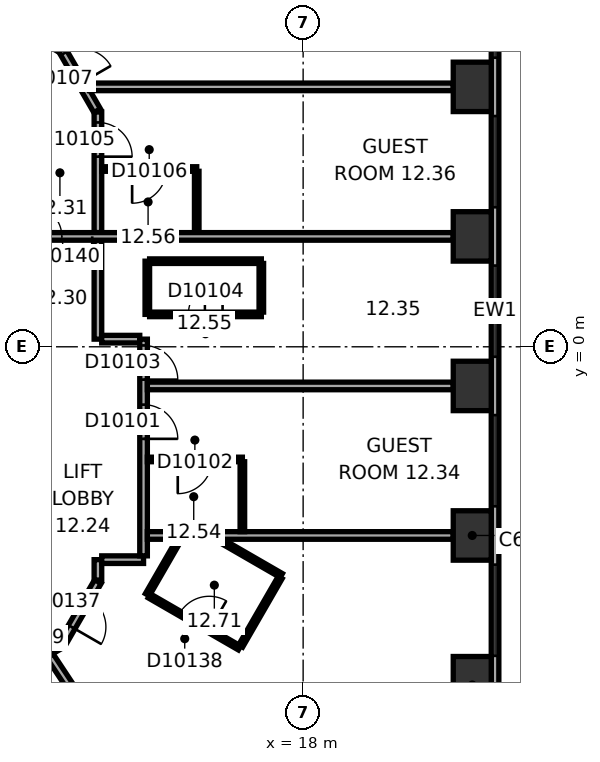
"""IFC4 building model, lengths in metres.
Left out: names, types, materials, properties, quantities, classifications, styles, units other than length and angle.
Written with IfcOpenShell. Run it as: python <this file> out.ifc"""

import sys

from ifc_helpers import new_model, si_unit, direction, frame, frame_2d, origin, origin_2d, place, context, subcontext, project, spatial, rectangle, extrude, element, fill, save


model = new_model("IFC4")
c1 = context("Model", 3, precision=1e-05, world=origin(), true_north=direction((0.0, 1.0)))
c2 = subcontext(c1, "Body", "Model", "MODEL_VIEW")
j1 = project(units=[si_unit("LENGTHUNIT", "METRE"), si_unit("PLANEANGLEUNIT", "RADIAN")], contexts=[c1])
p1 = place(None, origin())
s1 = spatial("IfcSite", under=j1, at=p1, CompositionType="ELEMENT")
p2 = place(p1, origin())
s2 = spatial("IfcBuilding", under=s1, at=p2, CompositionType="ELEMENT")
p3 = place(p2, frame((0.0, 0.0, 60.5)))
s3 = spatial("IfcBuildingStorey", under=s2, at=p3, CompositionType="ELEMENT", Elevation=60.5)
p4 = place(p3, frame((22.45, -8.899, 0.0), z_axis=(0.0, 0.0, 1.0), x_axis=(0.0, 1.0, 0.0)))
e1 = element("IfcColumn", 1, at=p4, inside=s3, PredefinedType="COLUMN", context=c2, shape_type="SweptSolid", body=[
    extrude(rectangle(XDim=1.5, YDim=1.0, at=origin_2d()), origin(), (0.0, 0.0, 1.0), 3.3),
])
for number, where, z_axis, x_axis in (
    (2, (22.45, -4.965, 0.0), (0.0, 0.0, 1.0), (0.0, 1.0, 0.0)),
    (3, (22.45, -1.03, 0.0), (0.0, 0.0, 1.0), (0.0, 1.0, 0.0)),
    (4, (22.45, 2.905, 0.0), (0.0, 0.0, 1.0), (0.0, 1.0, 0.0)),
    (5, (22.45, 6.839, 0.0), (0.0, 0.0, 1.0), (0.0, 1.0, 0.0)),
):
    element("IfcColumn", number, at=place(p3, frame(where, z_axis=z_axis, x_axis=x_axis)), inside=s3, PredefinedType="COLUMN", context=c2, shape_type="SweptSolid", body=[
        extrude(rectangle(XDim=1.3, YDim=1.0, at=origin_2d()), origin(), (0.0, 0.0, 1.0), 3.3),
    ])
p5 = place(p3, frame((23.05, -9.687, 0.0), z_axis=(0.0, 0.0, 1.0), x_axis=(0.0, 1.0, 0.0)))
e6 = element("IfcWall", 6, at=p5, inside=s3, PredefinedType="STANDARD", context=c2, shape_type="SweptSolid", body=[
    extrude(rectangle(XDim=21.246, YDim=0.2, at=frame_2d((10.623, 0.0))), origin(), (0.0, 0.0, 1.0), 3.3),
])
p6 = place(p5, frame((1.555, 0.0, 0.8)))
e7 = element("IfcOpeningElement", 7, at=p6, cuts=e6, PredefinedType="OPENING", context=c2, shape_type="SweptSolid", body=[
    extrude(rectangle(XDim=2.4, YDim=1.7, at=frame_2d((1.2, 0.85))), frame((0.0, 0.11, 0.0), z_axis=(0.0, -1.0, 0.0), x_axis=(1.0, 0.0, 0.0)), (0.0, 0.0, 1.0), 0.22),
])
p7 = place(p5, frame((5.489, 0.0, 0.8)))
e8 = element("IfcOpeningElement", 8, at=p7, cuts=e6, PredefinedType="OPENING", context=c2, shape_type="SweptSolid", body=[
    extrude(rectangle(XDim=2.4, YDim=1.7, at=frame_2d((1.2, 0.85))), frame((0.0, 0.11, 0.0), z_axis=(0.0, -1.0, 0.0), x_axis=(1.0, 0.0, 0.0)), (0.0, 0.0, 1.0), 0.22),
])
p8 = place(p5, frame((9.424, 0.0, 0.8)))
e9 = element("IfcOpeningElement", 9, at=p8, cuts=e6, PredefinedType="OPENING", context=c2, shape_type="SweptSolid", body=[
    extrude(rectangle(XDim=2.4, YDim=1.7, at=frame_2d((1.2, 0.85))), frame((0.0, 0.11, 0.0), z_axis=(0.0, -1.0, 0.0), x_axis=(1.0, 0.0, 0.0)), (0.0, 0.0, 1.0), 0.22),
])
p9 = place(p5, frame((13.358, 0.0, 0.8)))
e10 = element("IfcOpeningElement", 10, at=p9, cuts=e6, PredefinedType="OPENING", context=c2, shape_type="SweptSolid", body=[
    extrude(rectangle(XDim=2.4, YDim=1.7, at=frame_2d((1.2, 0.85))), frame((0.0, 0.11, 0.0), z_axis=(0.0, -1.0, 0.0), x_axis=(1.0, 0.0, 0.0)), (0.0, 0.0, 1.0), 0.22),
])
p10 = place(p5, frame((17.293, 0.0, 0.8)))
e11 = element("IfcOpeningElement", 11, at=p10, cuts=e6, PredefinedType="OPENING", context=c2, shape_type="SweptSolid", body=[
    extrude(rectangle(XDim=2.4, YDim=1.7, at=frame_2d((1.2, 0.85))), frame((0.0, 0.11, 0.0), z_axis=(0.0, -1.0, 0.0), x_axis=(1.0, 0.0, 0.0)), (0.0, 0.0, 1.0), 0.22),
])
p11 = place(p3, frame((9.852, -8.861, 0.0), z_axis=(0.0, 0.0, 1.0), x_axis=(0.866013291437, 0.500020978615, 0.0)))
e12 = element("IfcWall", 12, at=p11, inside=s3, PredefinedType="PARTITIONING", context=c2, shape_type="SweptSolid", body=[
    extrude(rectangle(XDim=2.077, YDim=0.2, at=frame_2d((1.038, 0.0))), origin(), (0.0, 0.0, 1.0), 3.05),
])
p12 = place(p3, frame((11.67, -7.788, 0.0), z_axis=(0.0, 0.0, 1.0), x_axis=(0.500063286585, 0.865988862174, 0.0)))
e13 = element("IfcWall", 13, at=p12, inside=s3, PredefinedType="PARTITIONING", context=c2, shape_type="SweptSolid", body=[
    extrude(rectangle(XDim=1.86, YDim=0.2, at=frame_2d((0.93, 0.0))), origin(), (0.0, 0.0, 1.0), 3.05),
])
p13 = place(p12, frame((0.48, 0.0, 0.0)))
e14 = element("IfcOpeningElement", 14, at=p13, cuts=e13, PredefinedType="OPENING", context=c2, shape_type="SweptSolid", body=[
    extrude(rectangle(XDim=0.9, YDim=2.1, at=frame_2d((0.45, 1.05))), frame((0.0, 0.11, 0.0), z_axis=(0.0, -1.0, 0.0), x_axis=(1.0, 0.0, 0.0)), (0.0, 0.0, 1.0), 0.22),
])
p14 = place(p3, frame((12.58, 6.212, 0.0), z_axis=(0.0, 0.0, 1.0), x_axis=(-0.500063286585, 0.865988862174, 0.0)))
e15 = element("IfcWall", 15, at=p14, inside=s3, PredefinedType="PARTITIONING", context=c2, shape_type="SweptSolid", body=[
    extrude(rectangle(XDim=1.86, YDim=0.2, at=frame_2d((0.93, 0.0))), origin(), (0.0, 0.0, 1.0), 3.05),
])
p15 = place(p14, frame((0.842, 0.0, 0.0)))
e16 = element("IfcOpeningElement", 16, at=p15, cuts=e15, PredefinedType="OPENING", context=c2, shape_type="SweptSolid", body=[
    extrude(rectangle(XDim=0.9, YDim=2.1, at=frame_2d((0.45, 1.05))), frame((0.0, 0.11, 0.0), z_axis=(0.0, -1.0, 0.0), x_axis=(1.0, 0.0, 0.0)), (0.0, 0.0, 1.0), 0.22),
])
p16 = place(p3, frame((12.6, -6.138, 0.0), z_axis=(0.0, 0.0, 1.0), x_axis=(0.0, 1.0, 0.0)))
e17 = element("IfcWall", 17, at=p16, inside=s3, PredefinedType="PARTITIONING", context=c2, shape_type="SweptSolid", body=[
    extrude(rectangle(XDim=0.537, YDim=0.2, at=frame_2d((0.268, 0.0))), origin(), (0.0, 0.0, 1.0), 3.05),
])
p17 = place(p3, frame((12.6, 0.201, 0.0), z_axis=(0.0, 0.0, 1.0), x_axis=(0.0, 1.0, 0.0)))
e18 = element("IfcWall", 18, at=p17, inside=s3, PredefinedType="PARTITIONING", context=c2, shape_type="SweptSolid", body=[
    extrude(rectangle(XDim=2.604, YDim=0.2, at=frame_2d((1.302, 0.0))), origin(), (0.0, 0.0, 1.0), 3.05),
])
p18 = place(p3, frame((12.6, 3.004, 0.0), z_axis=(0.0, 0.0, 1.0), x_axis=(0.0, 1.0, 0.0)))
e19 = element("IfcWall", 19, at=p18, inside=s3, PredefinedType="PARTITIONING", context=c2, shape_type="SweptSolid", body=[
    extrude(rectangle(XDim=3.173, YDim=0.2, at=frame_2d((1.586, 0.0))), origin(), (0.0, 0.0, 1.0), 3.05),
])
p19 = place(p18, frame((1.998, 0.0, 0.0)))
e20 = element("IfcOpeningElement", 20, at=p19, cuts=e19, PredefinedType="OPENING", context=c2, shape_type="SweptSolid", body=[
    extrude(rectangle(XDim=0.9, YDim=2.1, at=frame_2d((0.45, 1.05))), frame((0.0, 0.11, 0.0), z_axis=(0.0, -1.0, 0.0), x_axis=(1.0, 0.0, 0.0)), (0.0, 0.0, 1.0), 0.22),
])
p20 = place(p3, frame((12.7, -5.601, 0.0), z_axis=(0.0, 0.0, 1.0), x_axis=(1.0, 0.0, 0.0)))
e21 = element("IfcWall", 21, at=p20, inside=s3, PredefinedType="PARTITIONING", context=c2, shape_type="SweptSolid", body=[
    extrude(rectangle(XDim=1.101, YDim=0.2, at=frame_2d((0.551, 0.0))), origin(), (0.0, 0.0, 1.0), 3.05),
])
p21 = place(p3, frame((12.7, 4.677, 0.0), z_axis=(0.0, 0.0, 1.0), x_axis=(1.0, 0.0, 0.0)))
e22 = element("IfcWall", 22, at=p21, inside=s3, PredefinedType="PARTITIONING", context=c2, shape_type="SweptSolid", body=[
    extrude(rectangle(XDim=2.5, YDim=0.12, at=frame_2d((1.25, 0.0))), origin(), (0.0, 0.0, 1.0), 3.05),
])
p22 = place(p21, frame((0.8, 0.0, 0.0)))
e23 = element("IfcOpeningElement", 23, at=p22, cuts=e22, PredefinedType="OPENING", context=c2, shape_type="SweptSolid", body=[
    extrude(rectangle(XDim=0.9, YDim=2.1, at=frame_2d((0.45, 1.05))), frame((0.0, 0.07, 0.0), z_axis=(0.0, -1.0, 0.0), x_axis=(1.0, 0.0, 0.0)), (0.0, 0.0, 1.0), 0.14),
])
p23 = place(p3, frame((13.701, 0.201, 0.0), z_axis=(0.0, 0.0, 1.0), x_axis=(-1.0, 0.0, 0.0)))
e24 = element("IfcWall", 24, at=p23, inside=s3, PredefinedType="PARTITIONING", context=c2, shape_type="SweptSolid", body=[
    extrude(rectangle(XDim=1.001, YDim=0.2, at=frame_2d((0.5, 0.0))), origin(), (0.0, 0.0, 1.0), 3.05),
])
p24 = place(p3, frame((13.801, -5.501, 0.0), z_axis=(0.0, 0.0, 1.0), x_axis=(0.0, 1.0, 0.0)))
e25 = element("IfcWall", 25, at=p24, inside=s3, PredefinedType="PARTITIONING", context=c2, shape_type="SweptSolid", body=[
    extrude(rectangle(XDim=5.702, YDim=0.2, at=frame_2d((2.851, 0.0))), origin(), (0.0, 0.0, 1.0), 3.05),
])
p25 = place(p24, frame((3.079, 0.0, 0.0)))
e26 = element("IfcOpeningElement", 26, at=p25, cuts=e25, PredefinedType="OPENING", context=c2, shape_type="SweptSolid", body=[
    extrude(rectangle(XDim=0.9, YDim=2.1, at=frame_2d((0.45, 1.05))), frame((0.0, 0.11, 0.0), z_axis=(0.0, -1.0, 0.0), x_axis=(1.0, 0.0, 0.0)), (0.0, 0.0, 1.0), 0.22),
])
p26 = place(p24, frame((4.636, 0.0, 0.0)))
e27 = element("IfcOpeningElement", 27, at=p26, cuts=e25, PredefinedType="OPENING", context=c2, shape_type="SweptSolid", body=[
    extrude(rectangle(XDim=0.9, YDim=2.1, at=frame_2d((0.45, 1.05))), frame((0.0, 0.11, 0.0), z_axis=(0.0, -1.0, 0.0), x_axis=(1.0, 0.0, 0.0)), (0.0, 0.0, 1.0), 0.22),
])
p27 = place(p3, frame((13.901, -6.524, 0.0), z_axis=(0.0, 0.0, 1.0), x_axis=(0.499964162598, 0.86604609353, 0.0)))
e28 = element("IfcWall", 28, at=p27, inside=s3, PredefinedType="PARTITIONING", context=c2, shape_type="SweptSolid", body=[
    extrude(rectangle(XDim=1.661, YDim=0.12, at=frame_2d((0.831, 0.0))), origin(), (0.0, 0.0, 1.0), 3.05),
])
p28 = place(p3, frame((13.901, -4.965, 0.0), z_axis=(0.0, 0.0, 1.0), x_axis=(1.0, 0.0, 0.0)))
e29 = element("IfcWall", 29, at=p28, inside=s3, PredefinedType="PARTITIONING", context=c2, shape_type="SweptSolid", body=[
    extrude(rectangle(XDim=8.049, YDim=0.2, at=frame_2d((4.024, 0.0))), origin(), (0.0, 0.0, 1.0), 3.05),
])
p29 = place(p3, frame((13.901, -2.965, 0.0), z_axis=(0.0, 0.0, 1.0), x_axis=(1.0, 0.0, 0.0)))
e30 = element("IfcWall", 30, at=p29, inside=s3, PredefinedType="PARTITIONING", context=c2, shape_type="SweptSolid", body=[
    extrude(rectangle(XDim=2.5, YDim=0.12, at=frame_2d((1.25, 0.0))), origin(), (0.0, 0.0, 1.0), 3.05),
])
p30 = place(p29, frame((0.8, 0.0, 0.0)))
e31 = element("IfcOpeningElement", 31, at=p30, cuts=e30, PredefinedType="OPENING", context=c2, shape_type="SweptSolid", body=[
    extrude(rectangle(XDim=0.9, YDim=2.1, at=frame_2d((0.45, 1.05))), frame((0.0, 0.07, 0.0), z_axis=(0.0, -1.0, 0.0), x_axis=(1.0, 0.0, 0.0)), (0.0, 0.0, 1.0), 0.14),
])
p31 = place(p3, frame((13.9, 0.853, 0.0), z_axis=(0.0, 0.0, 1.0), x_axis=(0.0, 1.0, 0.0)))
e32 = element("IfcWall", 32, at=p31, inside=s3, PredefinedType="PARTITIONING", context=c2, shape_type="SweptSolid", body=[
    extrude(rectangle(XDim=1.4, YDim=0.12, at=frame_2d((0.7, 0.0))), origin(), (0.0, 0.0, 1.0), 3.05),
])
p32 = place(p3, frame((13.96, 2.253, 0.0), z_axis=(0.0, 0.0, 1.0), x_axis=(1.0, 0.0, 0.0)))
e33 = element("IfcWall", 33, at=p32, inside=s3, PredefinedType="PARTITIONING", context=c2, shape_type="SweptSolid", body=[
    extrude(rectangle(XDim=2.94, YDim=0.12, at=frame_2d((1.47, 0.0))), origin(), (0.0, 0.0, 1.0), 3.05),
])
p33 = place(p3, frame((15.2, 4.618, 0.0), z_axis=(0.0, 0.0, 1.0), x_axis=(0.0, -1.0, 0.0)))
e34 = element("IfcWall", 34, at=p33, inside=s3, PredefinedType="PARTITIONING", context=c2, shape_type="SweptSolid", body=[
    extrude(rectangle(XDim=1.613, YDim=0.12, at=frame_2d((0.807, 0.0))), origin(), (0.0, 0.0, 1.0), 3.05),
])
p34 = place(p3, frame((15.841, -5.104, 0.0), z_axis=(0.0, 0.0, 1.0), x_axis=(0.866025591402, -0.499999675036, 0.0)))
e35 = element("IfcWall", 35, at=p34, inside=s3, PredefinedType="PARTITIONING", context=c2, shape_type="SweptSolid", body=[
    extrude(rectangle(XDim=1.83, YDim=0.12, at=frame_2d((0.915, 0.0))), origin(), (0.0, 0.0, 1.0), 3.05),
])
p35 = place(p3, frame((16.255, -15.564, 0.0), z_axis=(0.0, 0.0, 1.0), x_axis=(-0.55192208744, 0.833895682562, 0.0)))
e36 = element("IfcWall", 36, at=p35, inside=s3, PredefinedType="PARTITIONING", context=c2, shape_type="SweptSolid", body=[
    extrude(rectangle(XDim=8.913, YDim=0.2, at=frame_2d((4.457, 0.0))), origin(), (0.0, 0.0, 1.0), 2.6),
])
p36 = place(p3, frame((16.326, -7.925, 0.0), z_axis=(0.0, 0.0, 1.0), x_axis=(-0.865997131366, 0.500048966069, 0.0)))
e37 = element("IfcWall", 37, at=p36, inside=s3, PredefinedType="PARTITIONING", context=c2, shape_type="SweptSolid", body=[
    extrude(rectangle(XDim=2.74, YDim=0.12, at=frame_2d((1.37, 0.0))), origin(), (0.0, 0.0, 1.0), 3.05),
])
p37 = place(p36, frame((0.92, 0.0, 0.0)))
e38 = element("IfcOpeningElement", 38, at=p37, cuts=e37, PredefinedType="OPENING", context=c2, shape_type="SweptSolid", body=[
    extrude(rectangle(XDim=0.9, YDim=2.1, at=frame_2d((0.45, 1.05))), frame((0.0, 0.07, 0.0), z_axis=(0.0, -1.0, 0.0), x_axis=(1.0, 0.0, 0.0)), (0.0, 0.0, 1.0), 0.14),
])
p38 = place(p3, frame((16.401, -3.025, 0.0), z_axis=(0.0, 0.0, 1.0), x_axis=(0.0, -1.0, 0.0)))
e39 = element("IfcWall", 39, at=p38, inside=s3, PredefinedType="PARTITIONING", context=c2, shape_type="SweptSolid", body=[
    extrude(rectangle(XDim=1.84, YDim=0.12, at=frame_2d((0.92, 0.0))), origin(), (0.0, 0.0, 1.0), 3.05),
])
p39 = place(p3, frame((16.9, 0.853, 0.0), z_axis=(0.0, 0.0, 1.0), x_axis=(-1.0, 0.0, 0.0)))
e40 = element("IfcWall", 40, at=p39, inside=s3, PredefinedType="PARTITIONING", context=c2, shape_type="SweptSolid", body=[
    extrude(rectangle(XDim=2.94, YDim=0.12, at=frame_2d((1.47, 0.0))), origin(), (0.0, 0.0, 1.0), 3.05),
])
p40 = place(p39, frame((1.02, 0.0, 0.0)))
e41 = element("IfcOpeningElement", 41, at=p40, cuts=e40, PredefinedType="OPENING", context=c2, shape_type="SweptSolid", body=[
    extrude(rectangle(XDim=0.9, YDim=2.1, at=frame_2d((0.45, 1.05))), frame((0.0, 0.07, 0.0), z_axis=(0.0, -1.0, 0.0), x_axis=(1.0, 0.0, 0.0)), (0.0, 0.0, 1.0), 0.14),
])
p41 = place(p3, frame((16.9, 2.193, 0.0), z_axis=(0.0, 0.0, 1.0), x_axis=(0.0, -1.0, 0.0)))
e42 = element("IfcWall", 42, at=p41, inside=s3, PredefinedType="PARTITIONING", context=c2, shape_type="SweptSolid", body=[
    extrude(rectangle(XDim=1.28, YDim=0.12, at=frame_2d((0.64, 0.0))), origin(), (0.0, 0.0, 1.0), 3.05),
])
p42 = place(p3, frame((17.396, -6.071, 0.0), z_axis=(0.0, 0.0, 1.0), x_axis=(-0.500027264788, -0.866009661879, 0.0)))
e43 = element("IfcWall", 43, at=p42, inside=s3, PredefinedType="PARTITIONING", context=c2, shape_type="SweptSolid", body=[
    extrude(rectangle(XDim=2.08, YDim=0.12, at=frame_2d((1.04, 0.0))), origin(), (0.0, 0.0, 1.0), 3.05),
])
p43 = place(p3, frame((21.95, -1.03, 0.0), z_axis=(0.0, 0.0, 1.0), x_axis=(-1.0, 0.0, 0.0)))
e44 = element("IfcWall", 44, at=p43, inside=s3, PredefinedType="PARTITIONING", context=c2, shape_type="SweptSolid", body=[
    extrude(rectangle(XDim=8.049, YDim=0.2, at=frame_2d((4.024, 0.0))), origin(), (0.0, 0.0, 1.0), 2.6),
])
p44 = place(p3, frame((21.95, 2.905, 0.0), z_axis=(0.0, 0.0, 1.0), x_axis=(-1.0, 0.0, 0.0)))
e45 = element("IfcWall", 45, at=p44, inside=s3, PredefinedType="PARTITIONING", context=c2, shape_type="SweptSolid", body=[
    extrude(rectangle(XDim=11.25, YDim=0.2, at=frame_2d((5.625, 0.0))), origin(), (0.0, 0.0, 1.0), 3.05),
])
p45 = place(p44, frame((9.5, 0.0, 0.0)))
e46 = element("IfcOpeningElement", 46, at=p45, cuts=e45, PredefinedType="OPENING", context=c2, shape_type="SweptSolid", body=[
    extrude(rectangle(XDim=1.6, YDim=2.1, at=frame_2d((0.8, 1.05))), frame((0.0, 0.11, 0.0), z_axis=(0.0, -1.0, 0.0), x_axis=(1.0, 0.0, 0.0)), (0.0, 0.0, 1.0), 0.22),
])
p46 = place(p3, frame((21.95, 6.839, 0.0), z_axis=(0.0, 0.0, 1.0), x_axis=(-1.0, 0.0, 0.0)))
e47 = element("IfcWall", 47, at=p46, inside=s3, PredefinedType="PARTITIONING", context=c2, shape_type="SweptSolid", body=[
    extrude(rectangle(XDim=9.572, YDim=0.2, at=frame_2d((4.786, 0.0))), origin(), (0.0, 0.0, 1.0), 3.05),
])
p47 = place(p6, origin())
e48 = element("IfcWindow", 48, at=p47, inside=s3, PartitioningType="SINGLE_PANEL", PredefinedType="WINDOW", context=c2, shape_type="SweptSolid", body=[
    extrude(rectangle(XDim=2.4, YDim=1.7, at=frame_2d((1.2, 0.85))), frame((0.0, 0.03, 0.0), z_axis=(0.0, -1.0, 0.0), x_axis=(1.0, 0.0, 0.0)), (0.0, 0.0, 1.0), 0.06),
])
fill(e7, e48)
p48 = place(p7, origin())
e49 = element("IfcWindow", 49, at=p48, inside=s3, PartitioningType="SINGLE_PANEL", PredefinedType="WINDOW", context=c2, shape_type="SweptSolid", body=[
    extrude(rectangle(XDim=2.4, YDim=1.7, at=frame_2d((1.2, 0.85))), frame((0.0, 0.03, 0.0), z_axis=(0.0, -1.0, 0.0), x_axis=(1.0, 0.0, 0.0)), (0.0, 0.0, 1.0), 0.06),
])
fill(e8, e49)
p49 = place(p8, origin())
e50 = element("IfcWindow", 50, at=p49, inside=s3, PartitioningType="SINGLE_PANEL", PredefinedType="WINDOW", context=c2, shape_type="SweptSolid", body=[
    extrude(rectangle(XDim=2.4, YDim=1.7, at=frame_2d((1.2, 0.85))), frame((0.0, 0.03, 0.0), z_axis=(0.0, -1.0, 0.0), x_axis=(1.0, 0.0, 0.0)), (0.0, 0.0, 1.0), 0.06),
])
fill(e9, e50)
p50 = place(p9, origin())
e51 = element("IfcWindow", 51, at=p50, inside=s3, PartitioningType="SINGLE_PANEL", PredefinedType="WINDOW", context=c2, shape_type="SweptSolid", body=[
    extrude(rectangle(XDim=2.4, YDim=1.7, at=frame_2d((1.2, 0.85))), frame((0.0, 0.03, 0.0), z_axis=(0.0, -1.0, 0.0), x_axis=(1.0, 0.0, 0.0)), (0.0, 0.0, 1.0), 0.06),
])
fill(e10, e51)
p51 = place(p10, origin())
e52 = element("IfcWindow", 52, at=p51, inside=s3, PartitioningType="SINGLE_PANEL", PredefinedType="WINDOW", context=c2, shape_type="SweptSolid", body=[
    extrude(rectangle(XDim=2.4, YDim=1.7, at=frame_2d((1.2, 0.85))), frame((0.0, 0.03, 0.0), z_axis=(0.0, -1.0, 0.0), x_axis=(1.0, 0.0, 0.0)), (0.0, 0.0, 1.0), 0.06),
])
fill(e11, e52)
p52 = place(p25, origin())
e53 = element("IfcDoor", 53, at=p52, inside=s3, OperationType="SINGLE_SWING_LEFT", PredefinedType="DOOR", context=c2, shape_type="SweptSolid", body=[
    extrude(rectangle(XDim=0.9, YDim=2.1, at=frame_2d((0.45, 1.05))), frame((0.0, 0.025, 0.0), z_axis=(0.0, -1.0, 0.0), x_axis=(1.0, 0.0, 0.0)), (0.0, 0.0, 1.0), 0.05),
])
fill(e26, e53)
p53 = place(p30, origin())
e54 = element("IfcDoor", 54, at=p53, inside=s3, OperationType="SINGLE_SWING_LEFT", PredefinedType="DOOR", context=c2, shape_type="SweptSolid", body=[
    extrude(rectangle(XDim=0.9, YDim=2.1, at=frame_2d((0.45, 1.05))), frame((0.0, 0.025, 0.0), z_axis=(0.0, -1.0, 0.0), x_axis=(1.0, 0.0, 0.0)), (0.0, 0.0, 1.0), 0.05),
])
fill(e31, e54)
p54 = place(p26, origin())
e55 = element("IfcDoor", 55, at=p54, inside=s3, OperationType="SINGLE_SWING_LEFT", PredefinedType="DOOR", context=c2, shape_type="SweptSolid", body=[
    extrude(rectangle(XDim=0.9, YDim=2.1, at=frame_2d((0.45, 1.05))), frame((0.0, 0.025, 0.0), z_axis=(0.0, -1.0, 0.0), x_axis=(1.0, 0.0, 0.0)), (0.0, 0.0, 1.0), 0.05),
])
fill(e27, e55)
p55 = place(p40, origin())
e56 = element("IfcDoor", 56, at=p55, inside=s3, OperationType="SINGLE_SWING_LEFT", PredefinedType="DOOR", context=c2, shape_type="SweptSolid", body=[
    extrude(rectangle(XDim=0.9, YDim=2.1, at=frame_2d((0.45, 1.05))), frame((0.0, 0.025, 0.0), z_axis=(0.0, -1.0, 0.0), x_axis=(1.0, 0.0, 0.0)), (0.0, 0.0, 1.0), 0.05),
])
fill(e41, e56)
p56 = place(p19, origin())
e57 = element("IfcDoor", 57, at=p56, inside=s3, OperationType="SINGLE_SWING_LEFT", PredefinedType="DOOR", context=c2, shape_type="SweptSolid", body=[
    extrude(rectangle(XDim=0.9, YDim=2.1, at=frame_2d((0.45, 1.05))), frame((0.0, 0.025, 0.0), z_axis=(0.0, -1.0, 0.0), x_axis=(1.0, 0.0, 0.0)), (0.0, 0.0, 1.0), 0.05),
])
fill(e20, e57)
p57 = place(p22, origin())
e58 = element("IfcDoor", 58, at=p57, inside=s3, OperationType="SINGLE_SWING_LEFT", PredefinedType="DOOR", context=c2, shape_type="SweptSolid", body=[
    extrude(rectangle(XDim=0.9, YDim=2.1, at=frame_2d((0.45, 1.05))), frame((0.0, 0.025, 0.0), z_axis=(0.0, -1.0, 0.0), x_axis=(1.0, 0.0, 0.0)), (0.0, 0.0, 1.0), 0.05),
])
fill(e23, e58)
p58 = place(p15, origin())
e59 = element("IfcDoor", 59, at=p58, inside=s3, OperationType="SINGLE_SWING_LEFT", PredefinedType="DOOR", context=c2, shape_type="SweptSolid", body=[
    extrude(rectangle(XDim=0.9, YDim=2.1, at=frame_2d((0.45, 1.05))), frame((0.0, 0.025, 0.0), z_axis=(0.0, -1.0, 0.0), x_axis=(1.0, 0.0, 0.0)), (0.0, 0.0, 1.0), 0.05),
])
fill(e16, e59)
p59 = place(p13, origin())
e60 = element("IfcDoor", 60, at=p59, inside=s3, OperationType="SINGLE_SWING_LEFT", PredefinedType="DOOR", context=c2, shape_type="SweptSolid", body=[
    extrude(rectangle(XDim=0.9, YDim=2.1, at=frame_2d((0.45, 1.05))), frame((0.0, 0.025, 0.0), z_axis=(0.0, -1.0, 0.0), x_axis=(1.0, 0.0, 0.0)), (0.0, 0.0, 1.0), 0.05),
])
fill(e14, e60)
p60 = place(p37, origin())
e61 = element("IfcDoor", 61, at=p60, inside=s3, OperationType="SINGLE_SWING_LEFT", PredefinedType="DOOR", context=c2, shape_type="SweptSolid", body=[
    extrude(rectangle(XDim=0.9, YDim=2.1, at=frame_2d((0.45, 1.05))), frame((0.0, 0.025, 0.0), z_axis=(0.0, -1.0, 0.0), x_axis=(1.0, 0.0, 0.0)), (0.0, 0.0, 1.0), 0.05),
])
fill(e38, e61)
p61 = place(p45, origin())
e62 = element("IfcDoor", 62, at=p61, inside=s3, OperationType="DOUBLE_DOOR_SINGLE_SWING", PredefinedType="DOOR", context=c2, shape_type="SweptSolid", body=[
    extrude(rectangle(XDim=1.6, YDim=2.1, at=frame_2d((0.8, 1.05))), frame((0.0, 0.025, 0.0), z_axis=(0.0, -1.0, 0.0), x_axis=(1.0, 0.0, 0.0)), (0.0, 0.0, 1.0), 0.05),
])
fill(e46, e62)
save(model, sys.argv[1])
